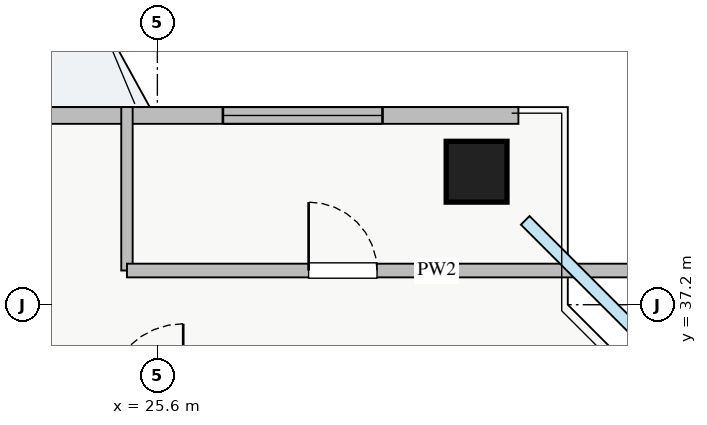
"""IFC4 building model, lengths in metres.
Left out: names, types, materials, properties, quantities, classifications, styles, units other than length and angle.
Written with IfcOpenShell. Run it as: python <this file> out.ifc"""

import sys

from ifc_helpers import new_model, si_unit, direction, frame, frame_2d, origin, origin_2d, place, context, subcontext, project, spatial, rectangle, extrude, source, transform, mapped, element, fill, save


model = new_model("IFC4")
c1 = context("Model", 3, precision=1e-05, world=origin(), true_north=direction((0.0, 1.0)))
c2 = subcontext(c1, "Body", "Model", "MODEL_VIEW")
j1 = project(units=[si_unit("LENGTHUNIT", "METRE"), si_unit("PLANEANGLEUNIT", "RADIAN")], contexts=[c1])
p1 = place(None, origin())
s1 = spatial("IfcSite", under=j1, at=p1, CompositionType="ELEMENT")
p2 = place(p1, origin())
s2 = spatial("IfcBuilding", under=s1, at=p2, CompositionType="ELEMENT")
p3 = place(p2, frame((0.0, 0.0, 197.0)))
s3 = spatial("IfcBuildingStorey", under=s2, at=p3, CompositionType="ELEMENT", Elevation=197.0)
m1 = source(origin(), c2, "Body", "SweptSolid", [
    extrude(rectangle(XDim=0.8, YDim=0.8, at=origin_2d()), origin(), (0.0, 0.0, 1.0), 3.25),
])
p4 = place(p3, frame((29.8, 38.95, 0.0), z_axis=(0.0, 0.0, 1.0), x_axis=(1.0, 0.0, 0.0)))
e1 = element("IfcColumn", 1, at=p4, inside=s3, PredefinedType="COLUMN", context=c2, shape_type="MappedRepresentation", body=[
    mapped(m1, transform((0.0, 0.0, 0.0), x_axis=(1.0, 0.0, 0.0), y_axis=(0.0, 1.0, 0.0), z_axis=(0.0, 0.0, 1.0), scale=1.0)),
])
p5 = place(p3, frame((7.65, 39.69, 0.0), z_axis=(0.0, 0.0, 1.0), x_axis=(1.0, 0.0, 0.0)))
e2 = element("IfcWall", 2, at=p5, inside=s3, PredefinedType="STANDARD", context=c2, shape_type="SweptSolid", body=[
    extrude(rectangle(XDim=22.7, YDim=0.22, at=frame_2d((11.35, 0.0))), origin(), (0.0, 0.0, 1.0), 2.61),
])
p6 = place(p5, frame((12.2, 0.0, 0.0)))
e3 = element("IfcOpeningElement", 3, at=p6, cuts=e2, PredefinedType="OPENING", context=c2, shape_type="SweptSolid", body=[
    extrude(rectangle(XDim=1.2, YDim=2.1, at=frame_2d((0.6, 1.05))), frame((0.0, 0.12, 0.0), z_axis=(0.0, -1.0, 0.0), x_axis=(1.0, 0.0, 0.0)), (0.0, 0.0, 1.0), 0.24),
])
p7 = place(p5, frame((1.637, 0.0, 0.9)))
e4 = element("IfcOpeningElement", 4, at=p7, cuts=e2, PredefinedType="OPENING", context=c2, shape_type="SweptSolid", body=[
    extrude(rectangle(XDim=2.4, YDim=1.48, at=frame_2d((1.2, 0.74))), frame((0.0, 0.12, 0.0), z_axis=(0.0, -1.0, 0.0), x_axis=(1.0, 0.0, 0.0)), (0.0, 0.0, 1.0), 0.24),
])
p8 = place(p5, frame((7.612, 0.0, 0.9)))
e5 = element("IfcOpeningElement", 5, at=p8, cuts=e2, PredefinedType="OPENING", context=c2, shape_type="SweptSolid", body=[
    extrude(rectangle(XDim=1.8, YDim=1.45, at=frame_2d((0.9, 0.725))), frame((0.0, 0.12, 0.0), z_axis=(0.0, -1.0, 0.0), x_axis=(1.0, 0.0, 0.0)), (0.0, 0.0, 1.0), 0.24),
])
p9 = place(p5, frame((18.812, 0.0, 0.9)))
e6 = element("IfcOpeningElement", 6, at=p9, cuts=e2, PredefinedType="OPENING", context=c2, shape_type="SweptSolid", body=[
    extrude(rectangle(XDim=2.1, YDim=1.48, at=frame_2d((1.05, 0.74))), frame((0.0, 0.12, 0.0), z_axis=(0.0, -1.0, 0.0), x_axis=(1.0, 0.0, 0.0)), (0.0, 0.0, 1.0), 0.24),
])
p10 = place(p3, frame((25.2, 37.65, 0.0), z_axis=(0.0, 0.0, 1.0), x_axis=(0.0, 1.0, 0.0)))
e7 = element("IfcWall", 7, at=p10, inside=s3, PredefinedType="PARTITIONING", context=c2, shape_type="SweptSolid", body=[
    extrude(rectangle(XDim=2.15, YDim=0.15, at=frame_2d((1.075, 0.0))), origin(), (0.0, 0.0, 1.0), 3.07),
])
p11 = place(p3, frame((25.2, 37.65, 0.0), z_axis=(0.0, 0.0, 1.0), x_axis=(1.0, 0.0, 0.0)))
e8 = element("IfcWall", 8, at=p11, inside=s3, PredefinedType="PARTITIONING", context=c2, shape_type="SweptSolid", body=[
    extrude(rectangle(XDim=7.25, YDim=0.18, at=frame_2d((3.625, 0.0))), origin(), (0.0, 0.0, 1.0), 3.07),
])
p12 = place(p11, frame((2.39, 0.0, 0.0)))
e9 = element("IfcOpeningElement", 9, at=p12, cuts=e8, PredefinedType="OPENING", context=c2, shape_type="SweptSolid", body=[
    extrude(rectangle(XDim=0.9, YDim=2.05, at=frame_2d((0.45, 1.025))), frame((0.0, 0.1, 0.0), z_axis=(0.0, -1.0, 0.0), x_axis=(1.0, 0.0, 0.0)), (0.0, 0.0, 1.0), 0.2),
])
m2 = source(origin(), c2, "Body", "SweptSolid", [
    extrude(rectangle(XDim=2.1, YDim=1.48, at=frame_2d((1.05, 0.74))), frame((0.0, 0.03, 0.0), z_axis=(0.0, -1.0, 0.0), x_axis=(1.0, 0.0, 0.0)), (0.0, 0.0, 1.0), 0.06),
])
p13 = place(p9, origin())
e10 = element("IfcWindow", 10, at=p13, inside=s3, PartitioningType="TRIPLE_PANEL_VERTICAL", PredefinedType="WINDOW", context=c2, shape_type="MappedRepresentation", body=[
    mapped(m2, transform((0.0, 0.0, 0.0), x_axis=(1.0, 0.0, 0.0), y_axis=(0.0, 1.0, 0.0), z_axis=(0.0, 0.0, 1.0), scale=1.0)),
])
fill(e6, e10)
m3 = source(origin(), c2, "Body", "SweptSolid", [
    extrude(rectangle(XDim=0.9, YDim=2.05, at=frame_2d((0.45, 1.025))), frame((0.0, 0.025, 0.0), z_axis=(0.0, -1.0, 0.0), x_axis=(1.0, 0.0, 0.0)), (0.0, 0.0, 1.0), 0.05),
])
p14 = place(p12, origin())
e11 = element("IfcDoor", 11, at=p14, inside=s3, OperationType="SINGLE_SWING_LEFT", PredefinedType="DOOR", context=c2, shape_type="MappedRepresentation", body=[
    mapped(m3, transform((0.0, 0.0, 0.0), x_axis=(1.0, 0.0, 0.0), y_axis=(0.0, 1.0, 0.0), z_axis=(0.0, 0.0, 1.0), scale=1.0)),
])
fill(e9, e11)
save(model, sys.argv[1])
